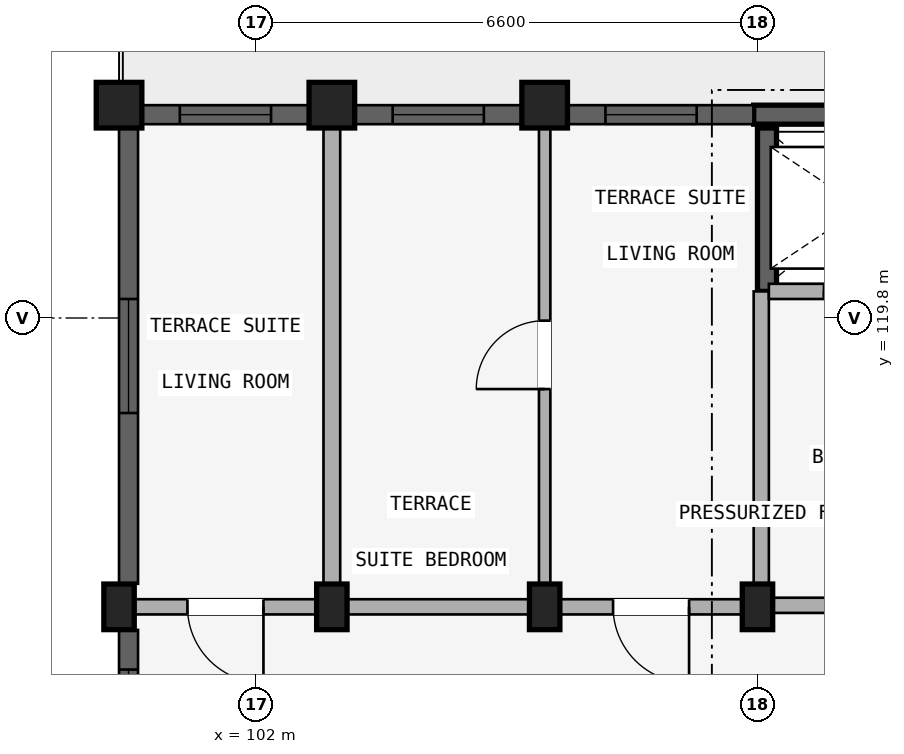
"""IFC4 building model, lengths in metres.
Left out: names, types, materials, properties, quantities, classifications, styles, units other than length and angle.
Written with IfcOpenShell. Run it as: python <this file> out.ifc"""

import sys

from ifc_helpers import new_model, si_unit, direction, frame, frame_2d, origin, origin_2d, place, context, subcontext, project, spatial, rectangle, extrude, element, fill, save


model = new_model("IFC4")
c1 = context("Model", 3, precision=1e-05, world=origin(), true_north=direction((0.0, 1.0)))
c2 = subcontext(c1, "Body", "Model", "MODEL_VIEW")
j1 = project(units=[si_unit("LENGTHUNIT", "METRE"), si_unit("PLANEANGLEUNIT", "RADIAN")], contexts=[c1])
p1 = place(None, origin())
s1 = spatial("IfcSite", under=j1, at=p1, CompositionType="ELEMENT")
p2 = place(p1, origin())
s2 = spatial("IfcBuilding", under=s1, at=p2, CompositionType="ELEMENT")
p3 = place(p2, frame((0.0, 0.0, 40.2)))
s3 = spatial("IfcBuildingStorey", under=s2, at=p3, CompositionType="ELEMENT", Elevation=40.2)
p4 = place(p3, frame((111.35, 122.475, 0.0), z_axis=(0.0, 0.0, 1.0), x_axis=(-1.0, 0.0, 0.0)))
e1 = element("IfcWall", 1, at=p4, inside=s3, PredefinedType="SHEAR", context=c2, shape_type="SweptSolid", body=[
    extrude(rectangle(XDim=2.8, YDim=0.25, at=frame_2d((1.4, 0.0))), origin(), (0.0, 0.0, 1.0), 2.91),
])
p5 = place(p3, frame((108.725, 120.15, 0.0), z_axis=(0.0, 0.0, 1.0), x_axis=(0.0, 1.0, 0.0)))
e2 = element("IfcWall", 2, at=p5, inside=s3, PredefinedType="SHEAR", context=c2, shape_type="SweptSolid", body=[
    extrude(rectangle(XDim=2.15, YDim=0.25, at=frame_2d((1.075, 0.0))), origin(), (0.0, 0.0, 1.0), 2.91),
])
for number, where, z_axis, x_axis in (
    (3, (108.6, 116.0, 0.0), (0.0, 0.0, 1.0), (1.0, 0.0, 0.0)),
    (4, (105.8, 116.0, 0.0), (0.0, 0.0, 1.0), (1.0, 0.0, 0.0)),
):
    element("IfcColumn", number, at=place(p3, frame(where, z_axis=z_axis, x_axis=x_axis)), inside=s3, PredefinedType="COLUMN", context=c2, shape_type="SweptSolid", body=[
        extrude(rectangle(XDim=0.4, YDim=0.6, at=origin_2d()), origin(), (0.0, 0.0, 1.0), 2.91),
    ])
p6 = place(p3, frame((105.8, 122.6, 0.0), z_axis=(0.0, 0.0, 1.0), x_axis=(1.0, 0.0, 0.0)))
e5 = element("IfcColumn", 5, at=p6, inside=s3, PredefinedType="COLUMN", context=c2, shape_type="SweptSolid", body=[
    extrude(rectangle(XDim=0.6, YDim=0.6, at=origin_2d()), origin(), (0.0, 0.0, 1.0), 2.91),
])
p7 = place(p3, frame((103.0, 116.0, 0.0), z_axis=(0.0, 0.0, 1.0), x_axis=(1.0, 0.0, 0.0)))
e6 = element("IfcColumn", 6, at=p7, inside=s3, PredefinedType="COLUMN", context=c2, shape_type="SweptSolid", body=[
    extrude(rectangle(XDim=0.4, YDim=0.6, at=origin_2d()), origin(), (0.0, 0.0, 1.0), 2.91),
])
p8 = place(p3, frame((103.0, 122.6, 0.0), z_axis=(0.0, 0.0, 1.0), x_axis=(1.0, 0.0, 0.0)))
e7 = element("IfcColumn", 7, at=p8, inside=s3, PredefinedType="COLUMN", context=c2, shape_type="SweptSolid", body=[
    extrude(rectangle(XDim=0.6, YDim=0.6, at=origin_2d()), origin(), (0.0, 0.0, 1.0), 2.91),
])
p9 = place(p3, frame((100.2, 116.0, 0.0), z_axis=(0.0, 0.0, 1.0), x_axis=(1.0, 0.0, 0.0)))
e8 = element("IfcColumn", 8, at=p9, inside=s3, PredefinedType="COLUMN", context=c2, shape_type="SweptSolid", body=[
    extrude(rectangle(XDim=0.4, YDim=0.6, at=origin_2d()), origin(), (0.0, 0.0, 1.0), 2.91),
])
p10 = place(p3, frame((100.2, 122.6, 0.0), z_axis=(0.0, 0.0, 1.0), x_axis=(1.0, 0.0, 0.0)))
e9 = element("IfcColumn", 9, at=p10, inside=s3, PredefinedType="COLUMN", context=c2, shape_type="SweptSolid", body=[
    extrude(rectangle(XDim=0.6, YDim=0.6, at=origin_2d()), origin(), (0.0, 0.0, 1.0), 2.91),
])
p11 = place(p3, frame((114.3, 116.02, 0.0), z_axis=(0.0, 0.0, 1.0), x_axis=(-1.0, 0.0, 0.0)))
e10 = element("IfcWall", 10, at=p11, inside=s3, PredefinedType="STANDARD", context=c2, shape_type="SweptSolid", body=[
    extrude(rectangle(XDim=5.65, YDim=0.2, at=frame_2d((2.825, 0.0))), origin(), (0.0, 0.0, 1.0), 2.352),
])
p12 = place(p11, frame((1.923, 0.0, 0.0)))
e11 = element("IfcOpeningElement", 11, at=p12, cuts=e10, PredefinedType="OPENING", context=c2, shape_type="SweptSolid", body=[
    extrude(rectangle(XDim=1.24, YDim=2.15, at=frame_2d((0.62, 1.075))), frame((0.0, 0.11, 0.0), z_axis=(0.0, -1.0, 0.0), x_axis=(1.0, 0.0, 0.0)), (0.0, 0.0, 1.0), 0.22),
])
p13 = place(p3, frame((108.65, 116.02, 0.0), z_axis=(0.0, 0.0, 1.0), x_axis=(0.0, 1.0, 0.0)))
e12 = element("IfcWall", 12, at=p13, inside=s3, PredefinedType="STANDARD", context=c2, shape_type="SweptSolid", body=[
    extrude(rectangle(XDim=4.13, YDim=0.2, at=frame_2d((2.065, 0.0))), origin(), (0.0, 0.0, 1.0), 2.352),
])
p14 = place(p3, frame((111.3, 120.15, 0.0), z_axis=(0.0, 0.0, 1.0), x_axis=(-1.0, 0.0, 0.0)))
e13 = element("IfcWall", 13, at=p14, inside=s3, PredefinedType="STANDARD", context=c2, shape_type="SweptSolid", body=[
    extrude(rectangle(XDim=2.55, YDim=0.2, at=frame_2d((1.275, 0.0))), origin(), (0.0, 0.0, 1.0), 2.91),
])
p15 = place(p14, frame((0.725, 0.0, 0.0)))
e14 = element("IfcOpeningElement", 14, at=p15, cuts=e13, PredefinedType="OPENING", context=c2, shape_type="SweptSolid", body=[
    extrude(rectangle(XDim=1.1, YDim=2.15, at=frame_2d((0.55, 1.075))), frame((0.0, 0.11, 0.0), z_axis=(0.0, -1.0, 0.0), x_axis=(1.0, 0.0, 0.0)), (0.0, 0.0, 1.0), 0.22),
])
p16 = place(p3, frame((108.6, 116.0, 0.0), z_axis=(0.0, 0.0, 1.0), x_axis=(-1.0, 0.0, 0.0)))
e15 = element("IfcWall", 15, at=p16, inside=s3, PredefinedType="STANDARD", context=c2, shape_type="SweptSolid", body=[
    extrude(rectangle(XDim=2.8, YDim=0.2, at=frame_2d((1.4, 0.0))), origin(), (0.0, 0.0, 1.0), 2.352),
])
p17 = place(p16, frame((0.9, 0.0, 0.0)))
e16 = element("IfcOpeningElement", 16, at=p17, cuts=e15, PredefinedType="OPENING", context=c2, shape_type="SweptSolid", body=[
    extrude(rectangle(XDim=1.0, YDim=2.15, at=frame_2d((0.5, 1.075))), frame((0.0, 0.11, 0.0), z_axis=(0.0, -1.0, 0.0), x_axis=(1.0, 0.0, 0.0)), (0.0, 0.0, 1.0), 0.22),
])
p18 = place(p3, frame((105.8, 116.0, 0.0), z_axis=(0.0, 0.0, 1.0), x_axis=(-1.0, 0.0, 0.0)))
e17 = element("IfcWall", 17, at=p18, inside=s3, PredefinedType="STANDARD", context=c2, shape_type="SweptSolid", body=[
    extrude(rectangle(XDim=2.8, YDim=0.2, at=frame_2d((1.4, 0.0))), origin(), (0.0, 0.0, 1.0), 2.352),
])
p19 = place(p3, frame((103.0, 116.0, 0.0), z_axis=(0.0, 0.0, 1.0), x_axis=(-1.0, 0.0, 0.0)))
e18 = element("IfcWall", 18, at=p19, inside=s3, PredefinedType="STANDARD", context=c2, shape_type="SweptSolid", body=[
    extrude(rectangle(XDim=2.8, YDim=0.2, at=frame_2d((1.4, 0.0))), origin(), (0.0, 0.0, 1.0), 2.352),
])
p20 = place(p19, frame((0.9, 0.0, 0.0)))
e19 = element("IfcOpeningElement", 19, at=p20, cuts=e18, PredefinedType="OPENING", context=c2, shape_type="SweptSolid", body=[
    extrude(rectangle(XDim=1.0, YDim=2.15, at=frame_2d((0.5, 1.075))), frame((0.0, 0.11, 0.0), z_axis=(0.0, -1.0, 0.0), x_axis=(1.0, 0.0, 0.0)), (0.0, 0.0, 1.0), 0.22),
])
p21 = place(p3, frame((105.8, 116.05, 0.0), z_axis=(0.0, 0.0, 1.0), x_axis=(0.0, 1.0, 0.0)))
e20 = element("IfcWall", 20, at=p21, inside=s3, PredefinedType="PARTITIONING", context=c2, shape_type="SweptSolid", body=[
    extrude(rectangle(XDim=6.53, YDim=0.15, at=frame_2d((3.265, 0.0))), origin(), (0.0, 0.0, 1.0), 2.352),
])
p22 = place(p21, frame((2.815, 0.0, 0.0)))
e21 = element("IfcOpeningElement", 21, at=p22, cuts=e20, PredefinedType="OPENING", context=c2, shape_type="SweptSolid", body=[
    extrude(rectangle(XDim=0.9, YDim=2.1, at=frame_2d((0.45, 1.05))), frame((0.0, 0.085, 0.0), z_axis=(0.0, -1.0, 0.0), x_axis=(1.0, 0.0, 0.0)), (0.0, 0.0, 1.0), 0.17),
])
p23 = place(p3, frame((103.0, 116.05, 0.0), z_axis=(0.0, 0.0, 1.0), x_axis=(0.0, 1.0, 0.0)))
e22 = element("IfcWall", 22, at=p23, inside=s3, PredefinedType="STANDARD", context=c2, shape_type="SweptSolid", body=[
    extrude(rectangle(XDim=6.53, YDim=0.22, at=frame_2d((3.265, 0.0))), origin(), (0.0, 0.0, 1.0), 2.352),
])
p24 = place(p3, frame((108.546, 122.475, 0.0), z_axis=(0.0, 0.0, 1.0), x_axis=(-1.0, 0.0, 0.0)))
e23 = element("IfcWall", 23, at=p24, inside=s3, PredefinedType="STANDARD", context=c2, shape_type="SweptSolid", body=[
    extrude(rectangle(XDim=2.443, YDim=0.25, at=frame_2d((1.221, 0.0))), origin(), (0.0, 0.0, 1.0), 2.452),
])
p25 = place(p24, frame((0.747, 0.0, 0.752)))
e24 = element("IfcOpeningElement", 24, at=p25, cuts=e23, PredefinedType="OPENING", context=c2, shape_type="SweptSolid", body=[
    extrude(rectangle(XDim=1.2, YDim=1.5, at=frame_2d((0.6, 0.75))), frame((0.0, 0.135, 0.0), z_axis=(0.0, -1.0, 0.0), x_axis=(1.0, 0.0, 0.0)), (0.0, 0.0, 1.0), 0.27),
])
p26 = place(p3, frame((105.497, 122.475, 0.0), z_axis=(0.0, 0.0, 1.0), x_axis=(-1.0, 0.0, 0.0)))
e25 = element("IfcWall", 25, at=p26, inside=s3, PredefinedType="STANDARD", context=c2, shape_type="SweptSolid", body=[
    extrude(rectangle(XDim=2.193, YDim=0.25, at=frame_2d((1.097, 0.0))), origin(), (0.0, 0.0, 1.0), 2.452),
])
p27 = place(p26, frame((0.497, 0.0, 0.752)))
e26 = element("IfcOpeningElement", 26, at=p27, cuts=e25, PredefinedType="OPENING", context=c2, shape_type="SweptSolid", body=[
    extrude(rectangle(XDim=1.2, YDim=1.5, at=frame_2d((0.6, 0.75))), frame((0.0, 0.135, 0.0), z_axis=(0.0, -1.0, 0.0), x_axis=(1.0, 0.0, 0.0)), (0.0, 0.0, 1.0), 0.27),
])
p28 = place(p3, frame((102.697, 122.475, 0.0), z_axis=(0.0, 0.0, 1.0), x_axis=(-1.0, 0.0, 0.0)))
e27 = element("IfcWall", 27, at=p28, inside=s3, PredefinedType="STANDARD", context=c2, shape_type="SweptSolid", body=[
    extrude(rectangle(XDim=2.193, YDim=0.25, at=frame_2d((1.097, 0.0))), origin(), (0.0, 0.0, 1.0), 2.452),
])
p29 = place(p28, frame((0.497, 0.0, 0.752)))
e28 = element("IfcOpeningElement", 28, at=p29, cuts=e27, PredefinedType="OPENING", context=c2, shape_type="SweptSolid", body=[
    extrude(rectangle(XDim=1.2, YDim=1.5, at=frame_2d((0.6, 0.75))), frame((0.0, 0.135, 0.0), z_axis=(0.0, -1.0, 0.0), x_axis=(1.0, 0.0, 0.0)), (0.0, 0.0, 1.0), 0.27),
])
p30 = place(p3, frame((100.325, 113.904, 0.0), z_axis=(0.0, 0.0, 1.0), x_axis=(0.0, 1.0, 0.0)))
e29 = element("IfcWall", 29, at=p30, inside=s3, PredefinedType="STANDARD", context=c2, shape_type="SweptSolid", body=[
    extrude(rectangle(XDim=1.793, YDim=0.25, at=frame_2d((0.896, 0.0))), origin(), (0.0, 0.0, 1.0), 2.352),
])
p31 = place(p30, frame((0.521, 0.0, 0.88)))
e30 = element("IfcOpeningElement", 30, at=p31, cuts=e29, PredefinedType="OPENING", context=c2, shape_type="SweptSolid", body=[
    extrude(rectangle(XDim=0.75, YDim=1.05, at=frame_2d((0.375, 0.525))), frame((0.0, 0.135, 0.0), z_axis=(0.0, -1.0, 0.0), x_axis=(1.0, 0.0, 0.0)), (0.0, 0.0, 1.0), 0.27),
])
p32 = place(p3, frame((100.325, 116.303, 0.0), z_axis=(0.0, 0.0, 1.0), x_axis=(0.0, 1.0, 0.0)))
e31 = element("IfcWall", 31, at=p32, inside=s3, PredefinedType="STANDARD", context=c2, shape_type="SweptSolid", body=[
    extrude(rectangle(XDim=5.993, YDim=0.25, at=frame_2d((2.997, 0.0))), origin(), (0.0, 0.0, 1.0), 2.46),
])
p33 = place(p32, frame((2.247, 0.0, 0.61)))
e32 = element("IfcOpeningElement", 32, at=p33, cuts=e31, PredefinedType="OPENING", context=c2, shape_type="SweptSolid", body=[
    extrude(rectangle(XDim=1.5, YDim=1.65, at=frame_2d((0.75, 0.825))), frame((0.0, 0.135, 0.0), z_axis=(0.0, -1.0, 0.0), x_axis=(1.0, 0.0, 0.0)), (0.0, 0.0, 1.0), 0.27),
])
p34 = place(p25, origin())
e33 = element("IfcWindow", 33, at=p34, inside=s3, PartitioningType="SINGLE_PANEL", PredefinedType="WINDOW", context=c2, shape_type="SweptSolid", body=[
    extrude(rectangle(XDim=1.2, YDim=1.5, at=frame_2d((0.6, 0.75))), frame((0.0, 0.03, 0.0), z_axis=(0.0, -1.0, 0.0), x_axis=(1.0, 0.0, 0.0)), (0.0, 0.0, 1.0), 0.06),
])
fill(e24, e33)
p35 = place(p27, origin())
e34 = element("IfcWindow", 34, at=p35, inside=s3, PartitioningType="SINGLE_PANEL", PredefinedType="WINDOW", context=c2, shape_type="SweptSolid", body=[
    extrude(rectangle(XDim=1.2, YDim=1.5, at=frame_2d((0.6, 0.75))), frame((0.0, 0.03, 0.0), z_axis=(0.0, -1.0, 0.0), x_axis=(1.0, 0.0, 0.0)), (0.0, 0.0, 1.0), 0.06),
])
fill(e26, e34)
p36 = place(p29, origin())
e35 = element("IfcWindow", 35, at=p36, inside=s3, PartitioningType="SINGLE_PANEL", PredefinedType="WINDOW", context=c2, shape_type="SweptSolid", body=[
    extrude(rectangle(XDim=1.2, YDim=1.5, at=frame_2d((0.6, 0.75))), frame((0.0, 0.03, 0.0), z_axis=(0.0, -1.0, 0.0), x_axis=(1.0, 0.0, 0.0)), (0.0, 0.0, 1.0), 0.06),
])
fill(e28, e35)
p37 = place(p31, origin())
e36 = element("IfcWindow", 36, at=p37, inside=s3, PartitioningType="SINGLE_PANEL", PredefinedType="WINDOW", context=c2, shape_type="SweptSolid", body=[
    extrude(rectangle(XDim=0.75, YDim=1.05, at=frame_2d((0.375, 0.525))), frame((0.0, 0.03, 0.0), z_axis=(0.0, -1.0, 0.0), x_axis=(1.0, 0.0, 0.0)), (0.0, 0.0, 1.0), 0.06),
])
fill(e30, e36)
p38 = place(p33, origin())
e37 = element("IfcWindow", 37, at=p38, inside=s3, PartitioningType="DOUBLE_PANEL_VERTICAL", PredefinedType="WINDOW", context=c2, shape_type="SweptSolid", body=[
    extrude(rectangle(XDim=1.5, YDim=1.65, at=frame_2d((0.75, 0.825))), frame((0.0, 0.03, 0.0), z_axis=(0.0, -1.0, 0.0), x_axis=(1.0, 0.0, 0.0)), (0.0, 0.0, 1.0), 0.06),
])
fill(e32, e37)
p39 = place(p15, origin())
e38 = element("IfcDoor", 38, at=p39, inside=s3, OperationType="SLIDING_TO_LEFT", PredefinedType="DOOR", context=c2, shape_type="SweptSolid", body=[
    extrude(rectangle(XDim=1.1, YDim=2.15, at=frame_2d((0.55, 1.075))), frame((0.0, 0.025, 0.0), z_axis=(0.0, -1.0, 0.0), x_axis=(1.0, 0.0, 0.0)), (0.0, 0.0, 1.0), 0.05),
])
fill(e14, e38)
p40 = place(p17, origin())
e39 = element("IfcDoor", 39, at=p40, inside=s3, OperationType="SINGLE_SWING_LEFT", PredefinedType="DOOR", context=c2, shape_type="SweptSolid", body=[
    extrude(rectangle(XDim=1.0, YDim=2.15, at=frame_2d((0.5, 1.075))), frame((0.0, 0.025, 0.0), z_axis=(0.0, -1.0, 0.0), x_axis=(1.0, 0.0, 0.0)), (0.0, 0.0, 1.0), 0.05),
])
fill(e16, e39)
p41 = place(p20, origin())
e40 = element("IfcDoor", 40, at=p41, inside=s3, OperationType="SINGLE_SWING_LEFT", PredefinedType="DOOR", context=c2, shape_type="SweptSolid", body=[
    extrude(rectangle(XDim=1.0, YDim=2.15, at=frame_2d((0.5, 1.075))), frame((0.0, 0.025, 0.0), z_axis=(0.0, -1.0, 0.0), x_axis=(1.0, 0.0, 0.0)), (0.0, 0.0, 1.0), 0.05),
])
fill(e19, e40)
p42 = place(p22, origin())
e41 = element("IfcDoor", 41, at=p42, inside=s3, OperationType="SINGLE_SWING_LEFT", PredefinedType="DOOR", context=c2, shape_type="SweptSolid", body=[
    extrude(rectangle(XDim=0.9, YDim=2.1, at=frame_2d((0.45, 1.05))), frame((0.0, 0.025, 0.0), z_axis=(0.0, -1.0, 0.0), x_axis=(1.0, 0.0, 0.0)), (0.0, 0.0, 1.0), 0.05),
])
fill(e21, e41)
save(model, sys.argv[1])
